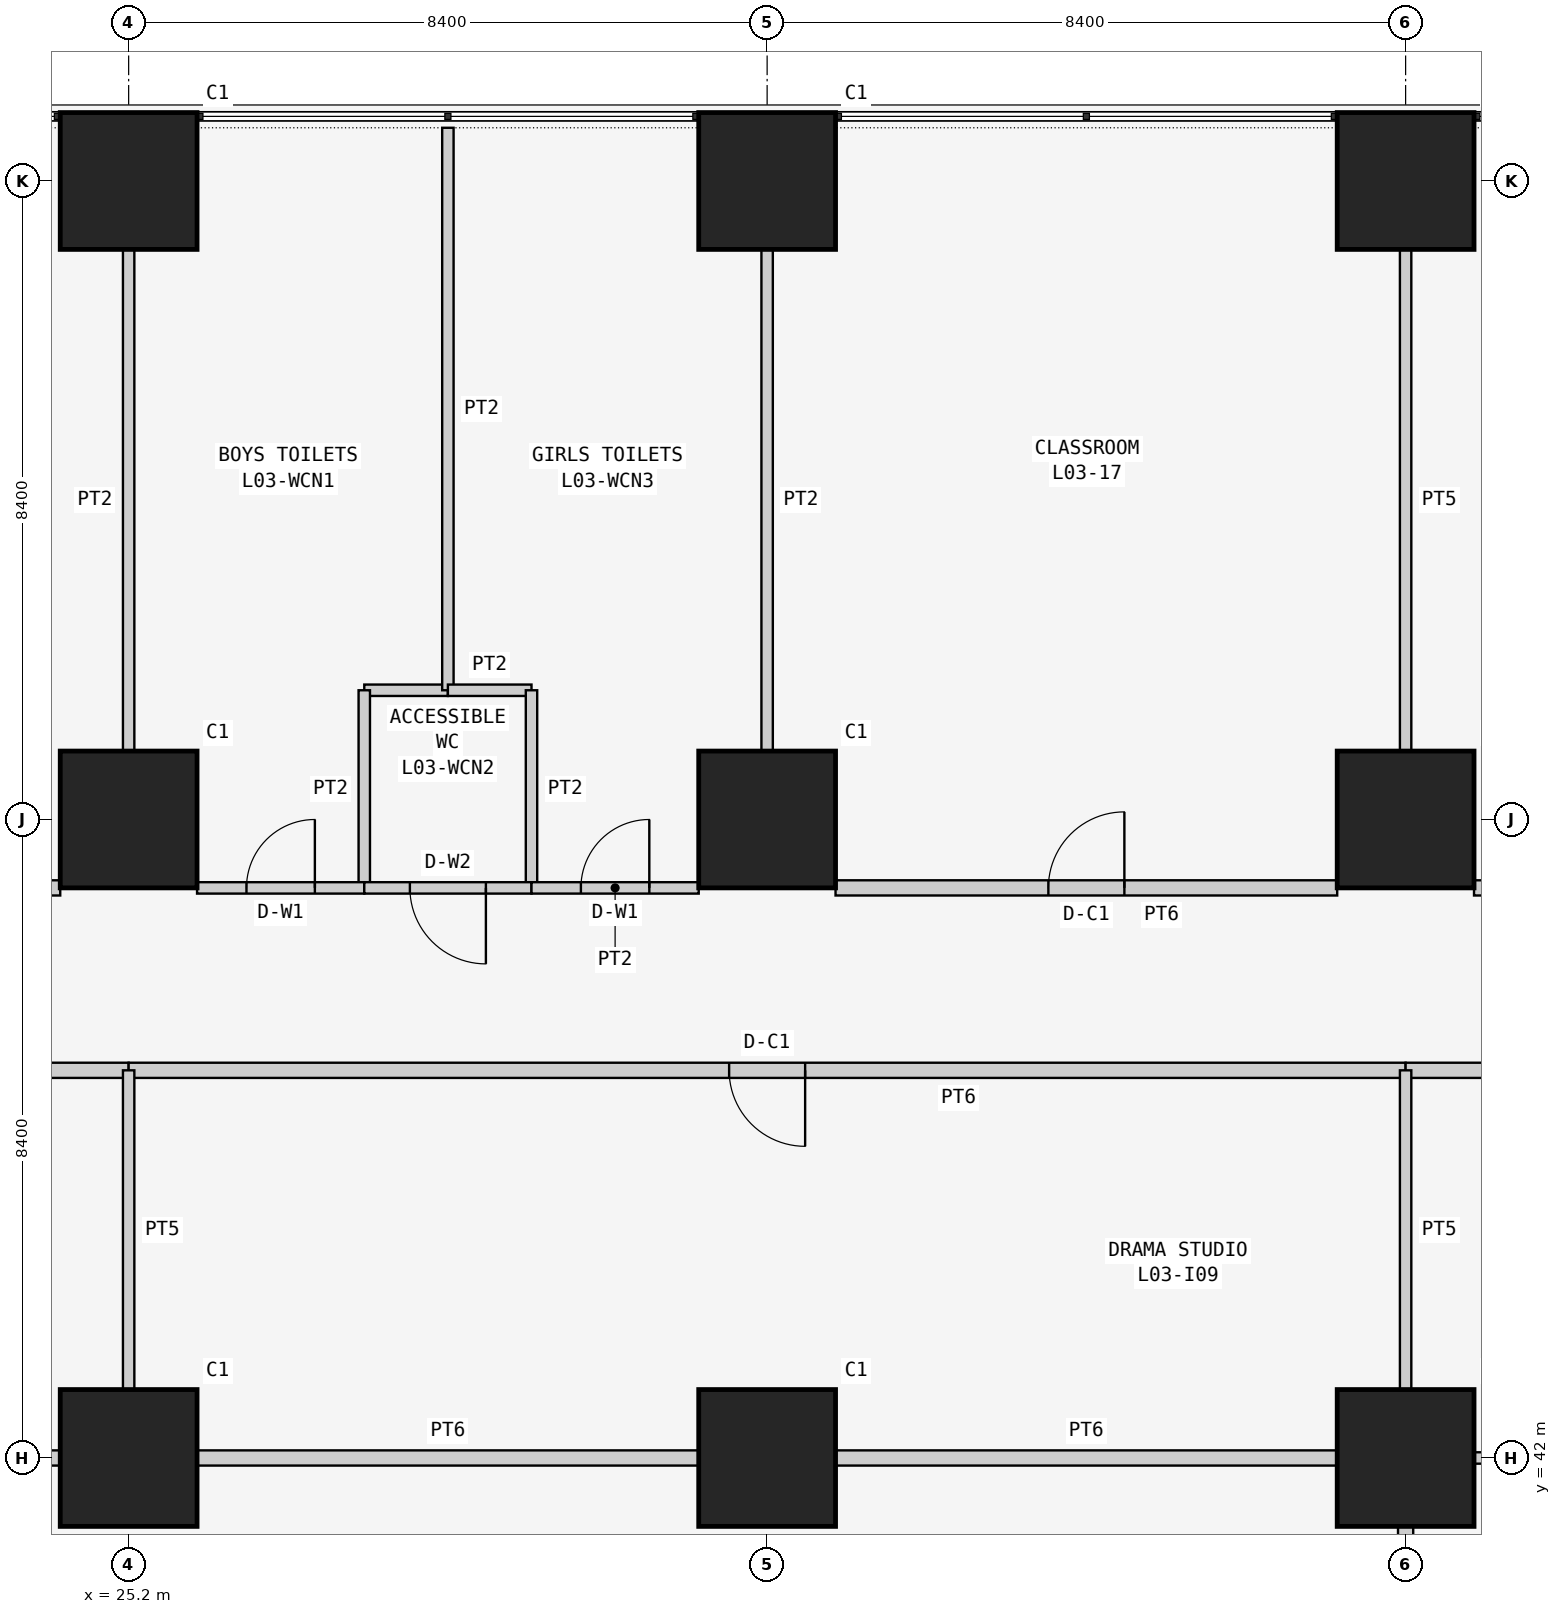
"""IFC4 building model, lengths in metres.
Left out: names, types, materials, properties, quantities, classifications, styles, units other than length and angle.
Written with IfcOpenShell. Run it as: python <this file> out.ifc"""

import sys

from ifc_helpers import new_model, si_unit, direction, frame, frame_2d, origin, origin_2d, place, context, subcontext, project, spatial, rectangle, extrude, element, fill, save


model = new_model("IFC4")
c1 = context("Model", 3, precision=1e-05, world=origin(), true_north=direction((0.0, 1.0)))
c2 = subcontext(c1, "Body", "Model", "MODEL_VIEW")
j1 = project(units=[si_unit("LENGTHUNIT", "METRE"), si_unit("PLANEANGLEUNIT", "RADIAN")], contexts=[c1])
p1 = place(None, origin())
s1 = spatial("IfcSite", under=j1, at=p1, CompositionType="ELEMENT")
p2 = place(p1, origin())
s2 = spatial("IfcBuilding", under=s1, at=p2, CompositionType="ELEMENT")
p3 = place(p2, frame((0.0, 0.0, 15.0)))
s3 = spatial("IfcBuildingStorey", under=s2, at=p3, CompositionType="ELEMENT", Elevation=15.0)
for number, where, z_axis, x_axis in (
    (1, (25.2, 42.0, 0.0), (0.0, 0.0, 1.0), (1.0, 0.0, 0.0)),
    (2, (25.2, 50.4, 0.0), (0.0, 0.0, 1.0), (1.0, 0.0, 0.0)),
    (3, (25.2, 58.8, 0.0), (0.0, 0.0, 1.0), (1.0, 0.0, 0.0)),
    (4, (33.6, 42.0, 0.0), (0.0, 0.0, 1.0), (1.0, 0.0, 0.0)),
    (5, (33.6, 50.4, 0.0), (0.0, 0.0, 1.0), (1.0, 0.0, 0.0)),
    (6, (33.6, 58.8, 0.0), (0.0, 0.0, 1.0), (1.0, 0.0, 0.0)),
    (7, (42.0, 42.0, 0.0), (0.0, 0.0, 1.0), (1.0, 0.0, 0.0)),
    (8, (42.0, 50.4, 0.0), (0.0, 0.0, 1.0), (1.0, 0.0, 0.0)),
    (9, (42.0, 58.8, 0.0), (0.0, 0.0, 1.0), (1.0, 0.0, 0.0)),
):
    element("IfcColumn", number, at=place(p3, frame(where, z_axis=z_axis, x_axis=x_axis)), inside=s3, PredefinedType="COLUMN", context=c2, shape_type="SweptSolid", body=[
        extrude(rectangle(XDim=1.8, YDim=1.8, at=origin_2d()), origin(), (0.0, 0.0, 1.0), 4.5),
    ])
p4 = place(p3, frame((29.4, 52.1, 0.0), z_axis=(0.0, 0.0, 1.0), x_axis=(-1.0, 0.0, 0.0)))
e10 = element("IfcWall", 10, at=p4, inside=s3, PredefinedType="PARTITIONING", context=c2, shape_type="SweptSolid", body=[
    extrude(rectangle(XDim=1.1, YDim=0.15, at=frame_2d((0.55, 0.0))), origin(), (0.0, 0.0, 1.0), 4.3),
])
p5 = place(p3, frame((28.3, 52.1, 0.0), z_axis=(0.0, 0.0, 1.0), x_axis=(0.0, -1.0, 0.0)))
e11 = element("IfcWall", 11, at=p5, inside=s3, PredefinedType="PARTITIONING", context=c2, shape_type="SweptSolid", body=[
    extrude(rectangle(XDim=2.6, YDim=0.15, at=frame_2d((1.3, 0.0))), origin(), (0.0, 0.0, 1.0), 4.3),
])
p6 = place(p3, frame((29.4, 59.5, 0.0), z_axis=(0.0, 0.0, 1.0), x_axis=(0.0, -1.0, 0.0)))
e12 = element("IfcWall", 12, at=p6, inside=s3, PredefinedType="PARTITIONING", context=c2, shape_type="SweptSolid", body=[
    extrude(rectangle(XDim=7.4, YDim=0.15, at=frame_2d((3.7, 0.0))), origin(), (0.0, 0.0, 1.0), 3.688),
])
p7 = place(p3, frame((25.2, 51.3, 0.0), z_axis=(0.0, 0.0, 1.0), x_axis=(0.0, 1.0, 0.0)))
e13 = element("IfcWall", 13, at=p7, inside=s3, PredefinedType="PARTITIONING", context=c2, shape_type="SweptSolid", body=[
    extrude(rectangle(XDim=6.6, YDim=0.15, at=frame_2d((3.3, 0.0))), origin(), (0.0, 0.0, 1.0), 3.543),
])
p8 = place(p3, frame((28.3, 49.5, 0.0), z_axis=(0.0, 0.0, 1.0), x_axis=(-1.0, 0.0, 0.0)))
e14 = element("IfcWall", 14, at=p8, inside=s3, PredefinedType="PARTITIONING", context=c2, shape_type="SweptSolid", body=[
    extrude(rectangle(XDim=2.2, YDim=0.15, at=frame_2d((1.1, 0.0))), origin(), (0.0, 0.0, 1.0), 4.3),
])
p9 = place(p8, frame((0.65, 0.0, 0.0)))
e15 = element("IfcOpeningElement", 15, at=p9, cuts=e14, PredefinedType="OPENING", context=c2, shape_type="SweptSolid", body=[
    extrude(rectangle(XDim=0.9, YDim=2.1, at=frame_2d((0.45, 1.05))), frame((0.0, 0.085, 0.0), z_axis=(0.0, -1.0, 0.0), x_axis=(1.0, 0.0, 0.0)), (0.0, 0.0, 1.0), 0.17),
])
p10 = place(p3, frame((29.4, 52.1, 0.0), z_axis=(0.0, 0.0, 1.0), x_axis=(1.0, 0.0, 0.0)))
e16 = element("IfcWall", 16, at=p10, inside=s3, PredefinedType="PARTITIONING", context=c2, shape_type="SweptSolid", body=[
    extrude(rectangle(XDim=1.1, YDim=0.15, at=frame_2d((0.55, 0.0))), origin(), (0.0, 0.0, 1.0), 4.3),
])
p11 = place(p3, frame((30.5, 52.1, 0.0), z_axis=(0.0, 0.0, 1.0), x_axis=(0.0, -1.0, 0.0)))
e17 = element("IfcWall", 17, at=p11, inside=s3, PredefinedType="PARTITIONING", context=c2, shape_type="SweptSolid", body=[
    extrude(rectangle(XDim=2.6, YDim=0.15, at=frame_2d((1.3, 0.0))), origin(), (0.0, 0.0, 1.0), 4.3),
])
p12 = place(p3, frame((30.5, 49.5, 0.0), z_axis=(0.0, 0.0, 1.0), x_axis=(-1.0, 0.0, 0.0)))
e18 = element("IfcWall", 18, at=p12, inside=s3, PredefinedType="PARTITIONING", context=c2, shape_type="SweptSolid", body=[
    extrude(rectangle(XDim=2.2, YDim=0.15, at=frame_2d((1.1, 0.0))), origin(), (0.0, 0.0, 1.0), 4.3),
])
p13 = place(p12, frame((0.6, 0.0, 0.0)))
e19 = element("IfcOpeningElement", 19, at=p13, cuts=e18, PredefinedType="OPENING", context=c2, shape_type="SweptSolid", body=[
    extrude(rectangle(XDim=1.0, YDim=2.1, at=frame_2d((0.5, 1.05))), frame((0.0, 0.085, 0.0), z_axis=(0.0, -1.0, 0.0), x_axis=(1.0, 0.0, 0.0)), (0.0, 0.0, 1.0), 0.17),
])
p14 = place(p3, frame((33.6, 57.9, 0.0), z_axis=(0.0, 0.0, 1.0), x_axis=(0.0, -1.0, 0.0)))
e20 = element("IfcWall", 20, at=p14, inside=s3, PredefinedType="PARTITIONING", context=c2, shape_type="SweptSolid", body=[
    extrude(rectangle(XDim=6.6, YDim=0.15, at=frame_2d((3.3, 0.0))), origin(), (0.0, 0.0, 1.0), 3.543),
])
p15 = place(p3, frame((32.7, 49.5, 0.0), z_axis=(0.0, 0.0, 1.0), x_axis=(-1.0, 0.0, 0.0)))
e21 = element("IfcWall", 21, at=p15, inside=s3, PredefinedType="PARTITIONING", context=c2, shape_type="SweptSolid", body=[
    extrude(rectangle(XDim=2.2, YDim=0.15, at=frame_2d((1.1, 0.0))), origin(), (0.0, 0.0, 1.0), 4.3),
])
p16 = place(p15, frame((0.65, 0.0, 0.0)))
e22 = element("IfcOpeningElement", 22, at=p16, cuts=e21, PredefinedType="OPENING", context=c2, shape_type="SweptSolid", body=[
    extrude(rectangle(XDim=0.9, YDim=2.1, at=frame_2d((0.45, 1.05))), frame((0.0, 0.085, 0.0), z_axis=(0.0, -1.0, 0.0), x_axis=(1.0, 0.0, 0.0)), (0.0, 0.0, 1.0), 0.17),
])
p17 = place(p3, frame((24.3, 49.5, 0.0), z_axis=(0.0, 0.0, 1.0), x_axis=(-1.0, 0.0, 0.0)))
e23 = element("IfcWall", 23, at=p17, inside=s3, PredefinedType="PARTITIONING", context=c2, shape_type="SweptSolid", body=[
    extrude(rectangle(XDim=6.6, YDim=0.2, at=frame_2d((3.3, 0.0))), origin(), (0.0, 0.0, 1.0), 4.3),
])
p18 = place(p17, frame((2.8, 0.0, 0.0)))
e24 = element("IfcOpeningElement", 24, at=p18, cuts=e23, PredefinedType="OPENING", context=c2, shape_type="SweptSolid", body=[
    extrude(rectangle(XDim=1.0, YDim=2.1, at=frame_2d((0.5, 1.05))), frame((0.0, 0.11, 0.0), z_axis=(0.0, -1.0, 0.0), x_axis=(1.0, 0.0, 0.0)), (0.0, 0.0, 1.0), 0.22),
])
p19 = place(p3, frame((42.0, 57.9, 0.0), z_axis=(0.0, 0.0, 1.0), x_axis=(0.0, -1.0, 0.0)))
e25 = element("IfcWall", 25, at=p19, inside=s3, PredefinedType="PARTITIONING", context=c2, shape_type="SweptSolid", body=[
    extrude(rectangle(XDim=6.6, YDim=0.15, at=frame_2d((3.3, 0.0))), origin(), (0.0, 0.0, 1.0), 3.543),
])
p20 = place(p3, frame((41.1, 49.5, 0.0), z_axis=(0.0, 0.0, 1.0), x_axis=(-1.0, 0.0, 0.0)))
e26 = element("IfcWall", 26, at=p20, inside=s3, PredefinedType="PARTITIONING", context=c2, shape_type="SweptSolid", body=[
    extrude(rectangle(XDim=6.6, YDim=0.2, at=frame_2d((3.3, 0.0))), origin(), (0.0, 0.0, 1.0), 4.3),
])
p21 = place(p20, frame((2.8, 0.0, 0.0)))
e27 = element("IfcOpeningElement", 27, at=p21, cuts=e26, PredefinedType="OPENING", context=c2, shape_type="SweptSolid", body=[
    extrude(rectangle(XDim=1.0, YDim=2.1, at=frame_2d((0.5, 1.05))), frame((0.0, 0.11, 0.0), z_axis=(0.0, -1.0, 0.0), x_axis=(1.0, 0.0, 0.0)), (0.0, 0.0, 1.0), 0.22),
])
p22 = place(p3, frame((47.1, 49.5, 0.0), z_axis=(0.0, 0.0, 1.0), x_axis=(-1.0, 0.0, 0.0)))
e28 = element("IfcWall", 28, at=p22, inside=s3, PredefinedType="PARTITIONING", context=c2, shape_type="SweptSolid", body=[
    extrude(rectangle(XDim=4.2, YDim=0.2, at=frame_2d((2.1, 0.0))), origin(), (0.0, 0.0, 1.0), 4.3),
])
p23 = place(p22, frame((1.6, 0.0, 0.0)))
e29 = element("IfcOpeningElement", 29, at=p23, cuts=e28, PredefinedType="OPENING", context=c2, shape_type="SweptSolid", body=[
    extrude(rectangle(XDim=1.0, YDim=2.1, at=frame_2d((0.5, 1.05))), frame((0.0, 0.11, 0.0), z_axis=(0.0, -1.0, 0.0), x_axis=(1.0, 0.0, 0.0)), (0.0, 0.0, 1.0), 0.22),
])
p24 = place(p3, frame((25.2, 47.1, 0.0), z_axis=(0.0, 0.0, 1.0), x_axis=(-1.0, 0.0, 0.0)))
e30 = element("IfcWall", 30, at=p24, inside=s3, PredefinedType="PARTITIONING", context=c2, shape_type="SweptSolid", body=[
    extrude(rectangle(XDim=13.5, YDim=0.2, at=frame_2d((6.75, 0.0))), origin(), (0.0, 0.0, 1.0), 4.3),
])
p25 = place(p24, frame((6.25, 0.0, 0.0)))
e31 = element("IfcOpeningElement", 31, at=p25, cuts=e30, PredefinedType="OPENING", context=c2, shape_type="SweptSolid", body=[
    extrude(rectangle(XDim=1.0, YDim=2.1, at=frame_2d((0.5, 1.05))), frame((0.0, 0.11, 0.0), z_axis=(0.0, -1.0, 0.0), x_axis=(1.0, 0.0, 0.0)), (0.0, 0.0, 1.0), 0.22),
])
p26 = place(p3, frame((42.0, 47.1, 0.0), z_axis=(0.0, 0.0, 1.0), x_axis=(-1.0, 0.0, 0.0)))
e32 = element("IfcWall", 32, at=p26, inside=s3, PredefinedType="PARTITIONING", context=c2, shape_type="SweptSolid", body=[
    extrude(rectangle(XDim=16.8, YDim=0.2, at=frame_2d((8.4, 0.0))), origin(), (0.0, 0.0, 1.0), 4.3),
])
p27 = place(p26, frame((7.9, 0.0, 0.0)))
e33 = element("IfcOpeningElement", 33, at=p27, cuts=e32, PredefinedType="OPENING", context=c2, shape_type="SweptSolid", body=[
    extrude(rectangle(XDim=1.0, YDim=2.1, at=frame_2d((0.5, 1.05))), frame((0.0, 0.11, 0.0), z_axis=(0.0, -1.0, 0.0), x_axis=(1.0, 0.0, 0.0)), (0.0, 0.0, 1.0), 0.22),
])
p28 = place(p3, frame((47.1, 47.1, 0.0), z_axis=(0.0, 0.0, 1.0), x_axis=(-1.0, 0.0, 0.0)))
e34 = element("IfcWall", 34, at=p28, inside=s3, PredefinedType="PARTITIONING", context=c2, shape_type="SweptSolid", body=[
    extrude(rectangle(XDim=5.1, YDim=0.2, at=frame_2d((2.55, 0.0))), origin(), (0.0, 0.0, 1.0), 4.3),
])
p29 = place(p3, frame((42.0, 41.1, 0.0), z_axis=(0.0, 0.0, 1.0), x_axis=(0.0, -1.0, 0.0)))
e35 = element("IfcWall", 35, at=p29, inside=s3, PredefinedType="PARTITIONING", context=c2, shape_type="SweptSolid", body=[
    extrude(rectangle(XDim=6.6, YDim=0.2, at=frame_2d((3.3, 0.0))), origin(), (0.0, 0.0, 1.0), 3.543),
])
p30 = place(p3, frame((20.5, 42.0, 0.0), z_axis=(0.0, 0.0, 1.0), x_axis=(1.0, 0.0, 0.0)))
e36 = element("IfcWall", 36, at=p30, inside=s3, PredefinedType="PARTITIONING", context=c2, shape_type="SweptSolid", body=[
    extrude(rectangle(XDim=3.8, YDim=0.2, at=frame_2d((1.9, 0.0))), origin(), (0.0, 0.0, 1.0), 3.543),
])
p31 = place(p3, frame((26.1, 42.0, 0.0), z_axis=(0.0, 0.0, 1.0), x_axis=(1.0, 0.0, 0.0)))
e37 = element("IfcWall", 37, at=p31, inside=s3, PredefinedType="PARTITIONING", context=c2, shape_type="SweptSolid", body=[
    extrude(rectangle(XDim=6.6, YDim=0.2, at=frame_2d((3.3, 0.0))), origin(), (0.0, 0.0, 1.0), 3.543),
])
p32 = place(p3, frame((34.5, 42.0, 0.0), z_axis=(0.0, 0.0, 1.0), x_axis=(1.0, 0.0, 0.0)))
e38 = element("IfcWall", 38, at=p32, inside=s3, PredefinedType="PARTITIONING", context=c2, shape_type="SweptSolid", body=[
    extrude(rectangle(XDim=6.6, YDim=0.2, at=frame_2d((3.3, 0.0))), origin(), (0.0, 0.0, 1.0), 3.543),
])
for number, where, z_axis, x_axis in (
    (39, (42.9, 42.0, 0.0), (0.0, 0.0, 1.0), (1.0, 0.0, 0.0)),
    (40, (25.2, 47.1, 0.0), (0.0, 0.0, 1.0), (0.0, -1.0, 0.0)),
    (41, (42.0, 47.1, 0.0), (0.0, 0.0, 1.0), (0.0, -1.0, 0.0)),
):
    element("IfcWall", number, at=place(p3, frame(where, z_axis=z_axis, x_axis=x_axis)), inside=s3, PredefinedType="PARTITIONING", context=c2, shape_type="SweptSolid", body=[
        extrude(rectangle(XDim=4.2, YDim=0.15, at=frame_2d((2.1, 0.0))), origin(), (0.0, 0.0, 1.0), 3.543),
    ])
p33 = place(p9, frame((0.9, 0.0, 0.0), z_axis=(0.0, 0.0, 1.0), x_axis=(-1.0, 0.0, 0.0)))
e42 = element("IfcDoor", 42, at=p33, inside=s3, OperationType="SINGLE_SWING_RIGHT", PredefinedType="DOOR", context=c2, shape_type="SweptSolid", body=[
    extrude(rectangle(XDim=0.9, YDim=2.1, at=frame_2d((0.45, 1.05))), frame((0.0, 0.025, 0.0), z_axis=(0.0, -1.0, 0.0), x_axis=(1.0, 0.0, 0.0)), (0.0, 0.0, 1.0), 0.05),
])
fill(e15, e42)
p34 = place(p13, origin())
e43 = element("IfcDoor", 43, at=p34, inside=s3, OperationType="SINGLE_SWING_LEFT", PredefinedType="DOOR", context=c2, shape_type="SweptSolid", body=[
    extrude(rectangle(XDim=1.0, YDim=2.1, at=frame_2d((0.5, 1.05))), frame((0.0, 0.025, 0.0), z_axis=(0.0, -1.0, 0.0), x_axis=(1.0, 0.0, 0.0)), (0.0, 0.0, 1.0), 0.05),
])
fill(e19, e43)
p35 = place(p16, frame((0.9, 0.0, 0.0), z_axis=(0.0, 0.0, 1.0), x_axis=(-1.0, 0.0, 0.0)))
e44 = element("IfcDoor", 44, at=p35, inside=s3, OperationType="SINGLE_SWING_RIGHT", PredefinedType="DOOR", context=c2, shape_type="SweptSolid", body=[
    extrude(rectangle(XDim=0.9, YDim=2.1, at=frame_2d((0.45, 1.05))), frame((0.0, 0.025, 0.0), z_axis=(0.0, -1.0, 0.0), x_axis=(1.0, 0.0, 0.0)), (0.0, 0.0, 1.0), 0.05),
])
fill(e22, e44)
p36 = place(p21, frame((1.0, 0.0, 0.0), z_axis=(0.0, 0.0, 1.0), x_axis=(-1.0, 0.0, 0.0)))
e45 = element("IfcDoor", 45, at=p36, inside=s3, OperationType="SINGLE_SWING_RIGHT", PredefinedType="DOOR", context=c2, shape_type="SweptSolid", body=[
    extrude(rectangle(XDim=1.0, YDim=2.1, at=frame_2d((0.5, 1.05))), frame((0.0, 0.025, 0.0), z_axis=(0.0, -1.0, 0.0), x_axis=(1.0, 0.0, 0.0)), (0.0, 0.0, 1.0), 0.05),
])
fill(e27, e45)
p37 = place(p27, origin())
e46 = element("IfcDoor", 46, at=p37, inside=s3, OperationType="SINGLE_SWING_LEFT", PredefinedType="DOOR", context=c2, shape_type="SweptSolid", body=[
    extrude(rectangle(XDim=1.0, YDim=2.1, at=frame_2d((0.5, 1.05))), frame((0.0, 0.025, 0.0), z_axis=(0.0, -1.0, 0.0), x_axis=(1.0, 0.0, 0.0)), (0.0, 0.0, 1.0), 0.05),
])
fill(e33, e46)
save(model, sys.argv[1])
